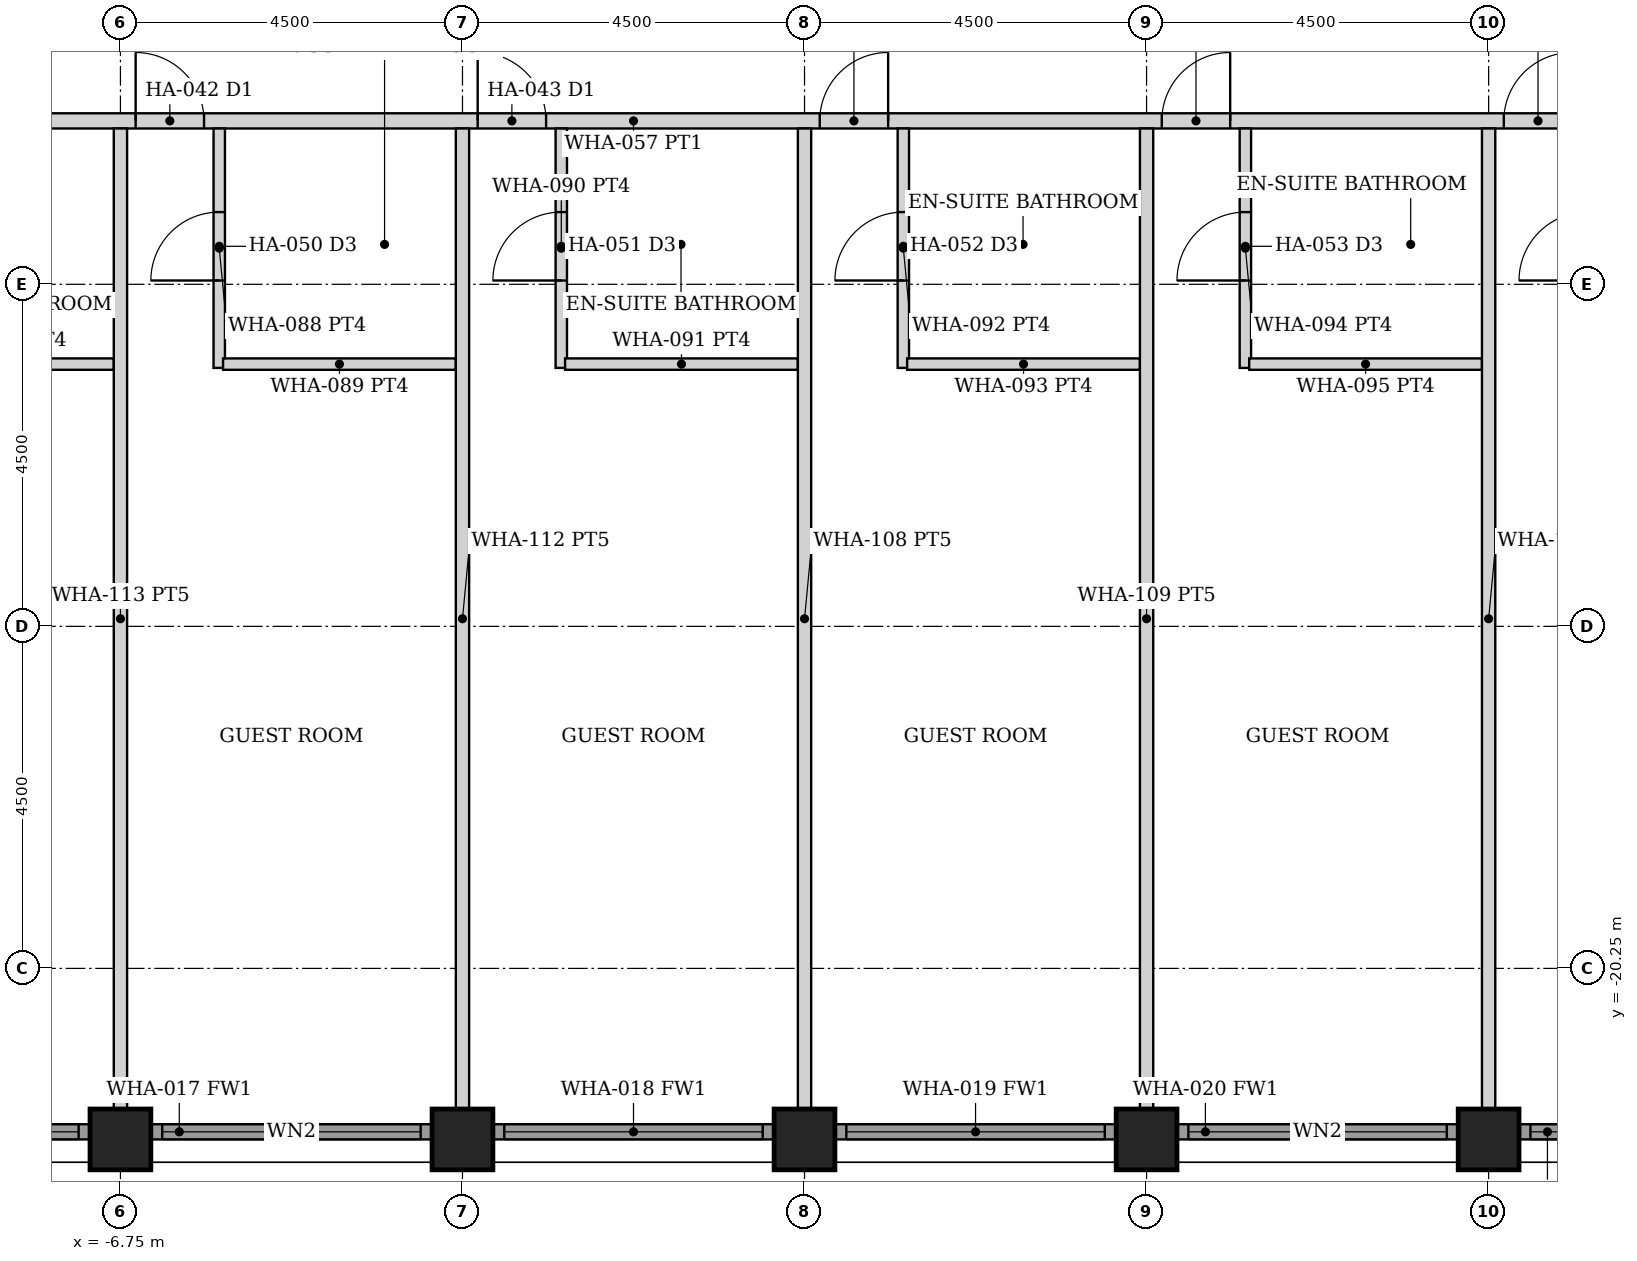
"""IFC4 building model, lengths in metres.
Left out: names, types, materials, properties, quantities, classifications, styles, units other than length and angle.
Written with IfcOpenShell. Run it as: python <this file> out.ifc"""

import sys

from ifc_helpers import new_model, si_unit, direction, frame, frame_2d, origin, origin_2d, place, context, subcontext, project, spatial, rectangle, hollow_rectangle, extrude, element, fill, save


model = new_model("IFC4")
c1 = context("Model", 3, precision=1e-05, world=origin(), true_north=direction((0.0, 1.0)))
c2 = subcontext(c1, "Body", "Model", "MODEL_VIEW")
j1 = project(units=[si_unit("LENGTHUNIT", "METRE"), si_unit("PLANEANGLEUNIT", "RADIAN")], contexts=[c1])
p1 = place(None, origin())
s1 = spatial("IfcSite", under=j1, at=p1, CompositionType="ELEMENT")
p2 = place(p1, origin())
s2 = spatial("IfcBuilding", under=s1, at=p2, CompositionType="ELEMENT")
p3 = place(p2, frame((0.0, 0.0, 118.4)))
s3 = spatial("IfcBuildingStorey", under=s2, at=p3, CompositionType="ELEMENT", Elevation=118.4)
for number, where, z_axis, x_axis in (
    (1, (-6.75, -22.5, 0.0), (0.0, 0.0, 1.0), (0.0, 1.0, 0.0)),
    (2, (-2.25, -22.5, 0.0), (0.0, 0.0, 1.0), (0.0, 1.0, 0.0)),
    (3, (2.25, -22.5, 0.0), (0.0, 0.0, 1.0), (0.0, 1.0, 0.0)),
    (4, (6.75, -22.5, 0.0), (0.0, 0.0, 1.0), (0.0, 1.0, 0.0)),
    (5, (11.25, -22.5, 0.0), (0.0, 0.0, 1.0), (0.0, 1.0, 0.0)),
):
    element("IfcColumn", number, at=place(p3, frame(where, z_axis=z_axis, x_axis=x_axis)), inside=s3, PredefinedType="COLUMN", context=c2, shape_type="SweptSolid", body=[
        extrude(hollow_rectangle(XDim=0.8, YDim=0.8, WallThickness=0.06, at=origin_2d()), origin(), (0.0, 0.0, 1.0), 3.6),
    ])
p4 = place(p3, frame((-10.845, -22.4, 0.0), z_axis=(0.0, 0.0, 1.0), x_axis=(1.0, 0.0, 0.0)))
e6 = element("IfcWall", 6, at=p4, inside=s3, PredefinedType="SOLIDWALL", context=c2, shape_type="SweptSolid", body=[
    extrude(rectangle(XDim=3.69, YDim=0.2, at=frame_2d((1.845, 0.0))), origin(), (0.0, 0.0, 1.0), 2.479),
])
p5 = place(p4, frame((0.145, 0.0, 0.3)))
e7 = element("IfcOpeningElement", 7, at=p5, cuts=e6, PredefinedType="OPENING", context=c2, shape_type="SweptSolid", body=[
    extrude(rectangle(XDim=3.4, YDim=2.029, at=frame_2d((1.7, 1.015))), frame((0.0, 0.11, 0.0), z_axis=(0.0, -1.0, 0.0), x_axis=(1.0, 0.0, 0.0)), (0.0, 0.0, 1.0), 0.22),
])
p6 = place(p3, frame((-6.345, -22.4, 0.0), z_axis=(0.0, 0.0, 1.0), x_axis=(1.0, 0.0, 0.0)))
e8 = element("IfcWall", 8, at=p6, inside=s3, PredefinedType="SOLIDWALL", context=c2, shape_type="SweptSolid", body=[
    extrude(rectangle(XDim=3.69, YDim=0.2, at=frame_2d((1.845, 0.0))), origin(), (0.0, 0.0, 1.0), 2.479),
])
p7 = place(p6, frame((0.145, 0.0, 0.3)))
e9 = element("IfcOpeningElement", 9, at=p7, cuts=e8, PredefinedType="OPENING", context=c2, shape_type="SweptSolid", body=[
    extrude(rectangle(XDim=3.4, YDim=2.029, at=frame_2d((1.7, 1.015))), frame((0.0, 0.11, 0.0), z_axis=(0.0, -1.0, 0.0), x_axis=(1.0, 0.0, 0.0)), (0.0, 0.0, 1.0), 0.22),
])
p8 = place(p3, frame((-1.845, -22.4, 0.0), z_axis=(0.0, 0.0, 1.0), x_axis=(1.0, 0.0, 0.0)))
e10 = element("IfcWall", 10, at=p8, inside=s3, PredefinedType="SOLIDWALL", context=c2, shape_type="SweptSolid", body=[
    extrude(rectangle(XDim=3.69, YDim=0.2, at=frame_2d((1.845, 0.0))), origin(), (0.0, 0.0, 1.0), 2.479),
])
p9 = place(p8, frame((0.145, 0.0, 0.3)))
e11 = element("IfcOpeningElement", 11, at=p9, cuts=e10, PredefinedType="OPENING", context=c2, shape_type="SweptSolid", body=[
    extrude(rectangle(XDim=3.4, YDim=2.029, at=frame_2d((1.7, 1.015))), frame((0.0, 0.11, 0.0), z_axis=(0.0, -1.0, 0.0), x_axis=(1.0, 0.0, 0.0)), (0.0, 0.0, 1.0), 0.22),
])
p10 = place(p3, frame((2.655, -22.4, 0.0), z_axis=(0.0, 0.0, 1.0), x_axis=(1.0, 0.0, 0.0)))
e12 = element("IfcWall", 12, at=p10, inside=s3, PredefinedType="SOLIDWALL", context=c2, shape_type="SweptSolid", body=[
    extrude(rectangle(XDim=3.69, YDim=0.2, at=frame_2d((1.845, 0.0))), origin(), (0.0, 0.0, 1.0), 2.479),
])
p11 = place(p10, frame((0.145, 0.0, 0.3)))
e13 = element("IfcOpeningElement", 13, at=p11, cuts=e12, PredefinedType="OPENING", context=c2, shape_type="SweptSolid", body=[
    extrude(rectangle(XDim=3.4, YDim=2.029, at=frame_2d((1.7, 1.015))), frame((0.0, 0.11, 0.0), z_axis=(0.0, -1.0, 0.0), x_axis=(1.0, 0.0, 0.0)), (0.0, 0.0, 1.0), 0.22),
])
p12 = place(p3, frame((7.155, -22.4, 0.0), z_axis=(0.0, 0.0, 1.0), x_axis=(1.0, 0.0, 0.0)))
e14 = element("IfcWall", 14, at=p12, inside=s3, PredefinedType="SOLIDWALL", context=c2, shape_type="SweptSolid", body=[
    extrude(rectangle(XDim=3.69, YDim=0.2, at=frame_2d((1.845, 0.0))), origin(), (0.0, 0.0, 1.0), 2.479),
])
p13 = place(p12, frame((0.145, 0.0, 0.3)))
e15 = element("IfcOpeningElement", 15, at=p13, cuts=e14, PredefinedType="OPENING", context=c2, shape_type="SweptSolid", body=[
    extrude(rectangle(XDim=3.4, YDim=2.029, at=frame_2d((1.7, 1.015))), frame((0.0, 0.11, 0.0), z_axis=(0.0, -1.0, 0.0), x_axis=(1.0, 0.0, 0.0)), (0.0, 0.0, 1.0), 0.22),
])
p14 = place(p3, frame((11.655, -22.4, 0.0), z_axis=(0.0, 0.0, 1.0), x_axis=(1.0, 0.0, 0.0)))
e16 = element("IfcWall", 16, at=p14, inside=s3, PredefinedType="SOLIDWALL", context=c2, shape_type="SweptSolid", body=[
    extrude(rectangle(XDim=3.69, YDim=0.2, at=frame_2d((1.845, 0.0))), origin(), (0.0, 0.0, 1.0), 2.479),
])
p15 = place(p14, frame((0.145, 0.0, 0.3)))
e17 = element("IfcOpeningElement", 17, at=p15, cuts=e16, PredefinedType="OPENING", context=c2, shape_type="SweptSolid", body=[
    extrude(rectangle(XDim=3.4, YDim=2.029, at=frame_2d((1.7, 1.015))), frame((0.0, 0.11, 0.0), z_axis=(0.0, -1.0, 0.0), x_axis=(1.0, 0.0, 0.0)), (0.0, 0.0, 1.0), 0.22),
])
p16 = place(p3, frame((-22.3, -9.1, 0.0), z_axis=(0.0, 0.0, 1.0), x_axis=(1.0, 0.0, 0.0)))
e18 = element("IfcWall", 18, at=p16, inside=s3, PredefinedType="PARTITIONING", context=c2, shape_type="SweptSolid", body=[
    extrude(rectangle(XDim=44.6, YDim=0.2, at=frame_2d((22.3, 0.0))), origin(), (0.0, 0.0, 1.0), 2.473),
])
p17 = place(p16, frame((6.75, 0.0, 0.0)))
e19 = element("IfcOpeningElement", 19, at=p17, cuts=e18, PredefinedType="OPENING", context=c2, shape_type="SweptSolid", body=[
    extrude(rectangle(XDim=0.9, YDim=2.1, at=frame_2d((0.45, 1.05))), frame((0.0, 0.11, 0.0), z_axis=(0.0, -1.0, 0.0), x_axis=(1.0, 0.0, 0.0)), (0.0, 0.0, 1.0), 0.22),
])
p18 = place(p16, frame((11.25, 0.0, 0.0)))
e20 = element("IfcOpeningElement", 20, at=p18, cuts=e18, PredefinedType="OPENING", context=c2, shape_type="SweptSolid", body=[
    extrude(rectangle(XDim=0.9, YDim=2.1, at=frame_2d((0.45, 1.05))), frame((0.0, 0.11, 0.0), z_axis=(0.0, -1.0, 0.0), x_axis=(1.0, 0.0, 0.0)), (0.0, 0.0, 1.0), 0.22),
])
p19 = place(p16, frame((15.75, 0.0, 0.0)))
e21 = element("IfcOpeningElement", 21, at=p19, cuts=e18, PredefinedType="OPENING", context=c2, shape_type="SweptSolid", body=[
    extrude(rectangle(XDim=0.9, YDim=2.1, at=frame_2d((0.45, 1.05))), frame((0.0, 0.11, 0.0), z_axis=(0.0, -1.0, 0.0), x_axis=(1.0, 0.0, 0.0)), (0.0, 0.0, 1.0), 0.22),
])
p20 = place(p16, frame((20.25, 0.0, 0.0)))
e22 = element("IfcOpeningElement", 22, at=p20, cuts=e18, PredefinedType="OPENING", context=c2, shape_type="SweptSolid", body=[
    extrude(rectangle(XDim=0.9, YDim=2.1, at=frame_2d((0.45, 1.05))), frame((0.0, 0.11, 0.0), z_axis=(0.0, -1.0, 0.0), x_axis=(1.0, 0.0, 0.0)), (0.0, 0.0, 1.0), 0.22),
])
p21 = place(p16, frame((24.75, 0.0, 0.0)))
e23 = element("IfcOpeningElement", 23, at=p21, cuts=e18, PredefinedType="OPENING", context=c2, shape_type="SweptSolid", body=[
    extrude(rectangle(XDim=0.9, YDim=2.1, at=frame_2d((0.45, 1.05))), frame((0.0, 0.11, 0.0), z_axis=(0.0, -1.0, 0.0), x_axis=(1.0, 0.0, 0.0)), (0.0, 0.0, 1.0), 0.22),
])
p22 = place(p16, frame((29.25, 0.0, 0.0)))
e24 = element("IfcOpeningElement", 24, at=p22, cuts=e18, PredefinedType="OPENING", context=c2, shape_type="SweptSolid", body=[
    extrude(rectangle(XDim=0.9, YDim=2.1, at=frame_2d((0.45, 1.05))), frame((0.0, 0.11, 0.0), z_axis=(0.0, -1.0, 0.0), x_axis=(1.0, 0.0, 0.0)), (0.0, 0.0, 1.0), 0.22),
])
p23 = place(p16, frame((33.75, 0.0, 0.0)))
e25 = element("IfcOpeningElement", 25, at=p23, cuts=e18, PredefinedType="OPENING", context=c2, shape_type="SweptSolid", body=[
    extrude(rectangle(XDim=0.9, YDim=2.1, at=frame_2d((0.45, 1.05))), frame((0.0, 0.11, 0.0), z_axis=(0.0, -1.0, 0.0), x_axis=(1.0, 0.0, 0.0)), (0.0, 0.0, 1.0), 0.22),
])
p24 = place(p16, frame((38.85, 0.0, 0.0)))
e26 = element("IfcOpeningElement", 26, at=p24, cuts=e18, PredefinedType="OPENING", context=c2, shape_type="SweptSolid", body=[
    extrude(rectangle(XDim=0.9, YDim=2.1, at=frame_2d((0.45, 1.05))), frame((0.0, 0.11, 0.0), z_axis=(0.0, -1.0, 0.0), x_axis=(1.0, 0.0, 0.0)), (0.0, 0.0, 1.0), 0.22),
])
p25 = place(p16, frame((4.85, 0.0, 0.0)))
e27 = element("IfcOpeningElement", 27, at=p25, cuts=e18, PredefinedType="OPENING", context=c2, shape_type="SweptSolid", body=[
    extrude(rectangle(XDim=0.9, YDim=2.1, at=frame_2d((0.45, 1.05))), frame((0.0, 0.11, 0.0), z_axis=(0.0, -1.0, 0.0), x_axis=(1.0, 0.0, 0.0)), (0.0, 0.0, 1.0), 0.22),
])
p26 = place(p3, frame((-9.9, -12.3, 0.0), z_axis=(0.0, 0.0, 1.0), x_axis=(1.0, 0.0, 0.0)))
e28 = element("IfcWall", 28, at=p26, inside=s3, PredefinedType="PARTITIONING", context=c2, shape_type="SweptSolid", body=[
    extrude(rectangle(XDim=3.062, YDim=0.15, at=frame_2d((1.531, 0.0))), origin(), (0.0, 0.0, 1.0), 2.473),
])
p27 = place(p3, frame((-5.45, -12.35, 0.0), z_axis=(0.0, 0.0, 1.0), x_axis=(0.0, 1.0, 0.0)))
e29 = element("IfcWall", 29, at=p27, inside=s3, PredefinedType="PARTITIONING", context=c2, shape_type="SweptSolid", body=[
    extrude(rectangle(XDim=3.15, YDim=0.15, at=frame_2d((1.575, 0.0))), origin(), (0.0, 0.0, 1.0), 2.473),
])
p28 = place(p27, frame((1.15, 0.0, 0.0)))
e30 = element("IfcOpeningElement", 30, at=p28, cuts=e29, PredefinedType="OPENING", context=c2, shape_type="SweptSolid", body=[
    extrude(rectangle(XDim=0.9, YDim=2.1, at=frame_2d((0.45, 1.05))), frame((0.0, 0.085, 0.0), z_axis=(0.0, -1.0, 0.0), x_axis=(1.0, 0.0, 0.0)), (0.0, 0.0, 1.0), 0.17),
])
p29 = place(p3, frame((-5.4, -12.3, 0.0), z_axis=(0.0, 0.0, 1.0), x_axis=(1.0, 0.0, 0.0)))
e31 = element("IfcWall", 31, at=p29, inside=s3, PredefinedType="PARTITIONING", context=c2, shape_type="SweptSolid", body=[
    extrude(rectangle(XDim=3.062, YDim=0.15, at=frame_2d((1.531, 0.0))), origin(), (0.0, 0.0, 1.0), 2.473),
])
p30 = place(p3, frame((-0.95, -12.35, 0.0), z_axis=(0.0, 0.0, 1.0), x_axis=(0.0, 1.0, 0.0)))
e32 = element("IfcWall", 32, at=p30, inside=s3, PredefinedType="PARTITIONING", context=c2, shape_type="SweptSolid", body=[
    extrude(rectangle(XDim=3.15, YDim=0.15, at=frame_2d((1.575, 0.0))), origin(), (0.0, 0.0, 1.0), 2.473),
])
p31 = place(p30, frame((1.15, 0.0, 0.0)))
e33 = element("IfcOpeningElement", 33, at=p31, cuts=e32, PredefinedType="OPENING", context=c2, shape_type="SweptSolid", body=[
    extrude(rectangle(XDim=0.9, YDim=2.1, at=frame_2d((0.45, 1.05))), frame((0.0, 0.085, 0.0), z_axis=(0.0, -1.0, 0.0), x_axis=(1.0, 0.0, 0.0)), (0.0, 0.0, 1.0), 0.17),
])
p32 = place(p3, frame((-0.9, -12.3, 0.0), z_axis=(0.0, 0.0, 1.0), x_axis=(1.0, 0.0, 0.0)))
e34 = element("IfcWall", 34, at=p32, inside=s3, PredefinedType="PARTITIONING", context=c2, shape_type="SweptSolid", body=[
    extrude(rectangle(XDim=3.062, YDim=0.15, at=frame_2d((1.531, 0.0))), origin(), (0.0, 0.0, 1.0), 2.473),
])
p33 = place(p3, frame((3.55, -12.35, 0.0), z_axis=(0.0, 0.0, 1.0), x_axis=(0.0, 1.0, 0.0)))
e35 = element("IfcWall", 35, at=p33, inside=s3, PredefinedType="PARTITIONING", context=c2, shape_type="SweptSolid", body=[
    extrude(rectangle(XDim=3.15, YDim=0.15, at=frame_2d((1.575, 0.0))), origin(), (0.0, 0.0, 1.0), 2.473),
])
p34 = place(p33, frame((1.15, 0.0, 0.0)))
e36 = element("IfcOpeningElement", 36, at=p34, cuts=e35, PredefinedType="OPENING", context=c2, shape_type="SweptSolid", body=[
    extrude(rectangle(XDim=0.9, YDim=2.1, at=frame_2d((0.45, 1.05))), frame((0.0, 0.085, 0.0), z_axis=(0.0, -1.0, 0.0), x_axis=(1.0, 0.0, 0.0)), (0.0, 0.0, 1.0), 0.17),
])
p35 = place(p3, frame((3.6, -12.3, 0.0), z_axis=(0.0, 0.0, 1.0), x_axis=(1.0, 0.0, 0.0)))
e37 = element("IfcWall", 37, at=p35, inside=s3, PredefinedType="PARTITIONING", context=c2, shape_type="SweptSolid", body=[
    extrude(rectangle(XDim=3.062, YDim=0.15, at=frame_2d((1.531, 0.0))), origin(), (0.0, 0.0, 1.0), 2.473),
])
p36 = place(p3, frame((8.05, -12.35, 0.0), z_axis=(0.0, 0.0, 1.0), x_axis=(0.0, 1.0, 0.0)))
e38 = element("IfcWall", 38, at=p36, inside=s3, PredefinedType="PARTITIONING", context=c2, shape_type="SweptSolid", body=[
    extrude(rectangle(XDim=3.15, YDim=0.15, at=frame_2d((1.575, 0.0))), origin(), (0.0, 0.0, 1.0), 2.473),
])
p37 = place(p36, frame((1.15, 0.0, 0.0)))
e39 = element("IfcOpeningElement", 39, at=p37, cuts=e38, PredefinedType="OPENING", context=c2, shape_type="SweptSolid", body=[
    extrude(rectangle(XDim=0.9, YDim=2.1, at=frame_2d((0.45, 1.05))), frame((0.0, 0.085, 0.0), z_axis=(0.0, -1.0, 0.0), x_axis=(1.0, 0.0, 0.0)), (0.0, 0.0, 1.0), 0.17),
])
p38 = place(p3, frame((8.1, -12.3, 0.0), z_axis=(0.0, 0.0, 1.0), x_axis=(1.0, 0.0, 0.0)))
e40 = element("IfcWall", 40, at=p38, inside=s3, PredefinedType="PARTITIONING", context=c2, shape_type="SweptSolid", body=[
    extrude(rectangle(XDim=3.062, YDim=0.15, at=frame_2d((1.531, 0.0))), origin(), (0.0, 0.0, 1.0), 2.473),
])
for number, where, z_axis, x_axis in (
    (41, (-6.75, -22.1, 0.0), (0.0, 0.0, 1.0), (0.0, 1.0, 0.0)),
    (42, (-2.25, -22.1, 0.0), (0.0, 0.0, 1.0), (0.0, 1.0, 0.0)),
    (43, (2.25, -22.1, 0.0), (0.0, 0.0, 1.0), (0.0, 1.0, 0.0)),
    (44, (6.75, -22.1, 0.0), (0.0, 0.0, 1.0), (0.0, 1.0, 0.0)),
    (45, (11.25, -22.1, 0.0), (0.0, 0.0, 1.0), (0.0, 1.0, 0.0)),
):
    element("IfcWall", number, at=place(p3, frame(where, z_axis=z_axis, x_axis=x_axis)), inside=s3, PredefinedType="PARTITIONING", context=c2, shape_type="SweptSolid", body=[
        extrude(rectangle(XDim=12.9, YDim=0.175, at=frame_2d((6.45, 0.0))), origin(), (0.0, 0.0, 1.0), 2.473),
    ])
p39 = place(p5, origin())
e46 = element("IfcWindow", 46, at=p39, inside=s3, PartitioningType="SINGLE_PANEL", PredefinedType="WINDOW", context=c2, shape_type="SweptSolid", body=[
    extrude(rectangle(XDim=3.4, YDim=2.029, at=frame_2d((1.7, 1.015))), frame((0.0, 0.03, 0.0), z_axis=(0.0, -1.0, 0.0), x_axis=(1.0, 0.0, 0.0)), (0.0, 0.0, 1.0), 0.06),
])
fill(e7, e46)
p40 = place(p7, origin())
e47 = element("IfcWindow", 47, at=p40, inside=s3, PartitioningType="SINGLE_PANEL", PredefinedType="WINDOW", context=c2, shape_type="SweptSolid", body=[
    extrude(rectangle(XDim=3.4, YDim=2.029, at=frame_2d((1.7, 1.015))), frame((0.0, 0.03, 0.0), z_axis=(0.0, -1.0, 0.0), x_axis=(1.0, 0.0, 0.0)), (0.0, 0.0, 1.0), 0.06),
])
fill(e9, e47)
p41 = place(p9, origin())
e48 = element("IfcWindow", 48, at=p41, inside=s3, PartitioningType="SINGLE_PANEL", PredefinedType="WINDOW", context=c2, shape_type="SweptSolid", body=[
    extrude(rectangle(XDim=3.4, YDim=2.029, at=frame_2d((1.7, 1.015))), frame((0.0, 0.03, 0.0), z_axis=(0.0, -1.0, 0.0), x_axis=(1.0, 0.0, 0.0)), (0.0, 0.0, 1.0), 0.06),
])
fill(e11, e48)
p42 = place(p11, origin())
e49 = element("IfcWindow", 49, at=p42, inside=s3, PartitioningType="SINGLE_PANEL", PredefinedType="WINDOW", context=c2, shape_type="SweptSolid", body=[
    extrude(rectangle(XDim=3.4, YDim=2.029, at=frame_2d((1.7, 1.015))), frame((0.0, 0.03, 0.0), z_axis=(0.0, -1.0, 0.0), x_axis=(1.0, 0.0, 0.0)), (0.0, 0.0, 1.0), 0.06),
])
fill(e13, e49)
p43 = place(p13, origin())
e50 = element("IfcWindow", 50, at=p43, inside=s3, PartitioningType="SINGLE_PANEL", PredefinedType="WINDOW", context=c2, shape_type="SweptSolid", body=[
    extrude(rectangle(XDim=3.4, YDim=2.029, at=frame_2d((1.7, 1.015))), frame((0.0, 0.03, 0.0), z_axis=(0.0, -1.0, 0.0), x_axis=(1.0, 0.0, 0.0)), (0.0, 0.0, 1.0), 0.06),
])
fill(e15, e50)
p44 = place(p15, origin())
e51 = element("IfcWindow", 51, at=p44, inside=s3, PartitioningType="SINGLE_PANEL", PredefinedType="WINDOW", context=c2, shape_type="SweptSolid", body=[
    extrude(rectangle(XDim=3.4, YDim=2.029, at=frame_2d((1.7, 1.015))), frame((0.0, 0.03, 0.0), z_axis=(0.0, -1.0, 0.0), x_axis=(1.0, 0.0, 0.0)), (0.0, 0.0, 1.0), 0.06),
])
fill(e17, e51)
p45 = place(p19, origin())
e52 = element("IfcDoor", 52, at=p45, inside=s3, OperationType="SINGLE_SWING_LEFT", PredefinedType="DOOR", context=c2, shape_type="SweptSolid", body=[
    extrude(rectangle(XDim=0.9, YDim=2.1, at=frame_2d((0.45, 1.05))), frame((0.0, 0.025, 0.0), z_axis=(0.0, -1.0, 0.0), x_axis=(1.0, 0.0, 0.0)), (0.0, 0.0, 1.0), 0.05),
])
fill(e21, e52)
p46 = place(p28, origin())
e53 = element("IfcDoor", 53, at=p46, inside=s3, OperationType="SINGLE_SWING_LEFT", PredefinedType="DOOR", context=c2, shape_type="SweptSolid", body=[
    extrude(rectangle(XDim=0.9, YDim=2.1, at=frame_2d((0.45, 1.05))), frame((0.0, 0.025, 0.0), z_axis=(0.0, -1.0, 0.0), x_axis=(1.0, 0.0, 0.0)), (0.0, 0.0, 1.0), 0.05),
])
fill(e30, e53)
p47 = place(p20, origin())
e54 = element("IfcDoor", 54, at=p47, inside=s3, OperationType="SINGLE_SWING_LEFT", PredefinedType="DOOR", context=c2, shape_type="SweptSolid", body=[
    extrude(rectangle(XDim=0.9, YDim=2.1, at=frame_2d((0.45, 1.05))), frame((0.0, 0.025, 0.0), z_axis=(0.0, -1.0, 0.0), x_axis=(1.0, 0.0, 0.0)), (0.0, 0.0, 1.0), 0.05),
])
fill(e22, e54)
p48 = place(p31, origin())
e55 = element("IfcDoor", 55, at=p48, inside=s3, OperationType="SINGLE_SWING_LEFT", PredefinedType="DOOR", context=c2, shape_type="SweptSolid", body=[
    extrude(rectangle(XDim=0.9, YDim=2.1, at=frame_2d((0.45, 1.05))), frame((0.0, 0.025, 0.0), z_axis=(0.0, -1.0, 0.0), x_axis=(1.0, 0.0, 0.0)), (0.0, 0.0, 1.0), 0.05),
])
fill(e33, e55)
p49 = place(p21, origin())
e56 = element("IfcDoor", 56, at=p49, inside=s3, OperationType="SINGLE_SWING_RIGHT", PredefinedType="DOOR", context=c2, shape_type="SweptSolid", body=[
    extrude(rectangle(XDim=0.9, YDim=2.1, at=frame_2d((0.45, 1.05))), frame((0.0, 0.025, 0.0), z_axis=(0.0, -1.0, 0.0), x_axis=(1.0, 0.0, 0.0)), (0.0, 0.0, 1.0), 0.05),
])
fill(e23, e56)
p50 = place(p34, origin())
e57 = element("IfcDoor", 57, at=p50, inside=s3, OperationType="SINGLE_SWING_LEFT", PredefinedType="DOOR", context=c2, shape_type="SweptSolid", body=[
    extrude(rectangle(XDim=0.9, YDim=2.1, at=frame_2d((0.45, 1.05))), frame((0.0, 0.025, 0.0), z_axis=(0.0, -1.0, 0.0), x_axis=(1.0, 0.0, 0.0)), (0.0, 0.0, 1.0), 0.05),
])
fill(e36, e57)
p51 = place(p22, origin())
e58 = element("IfcDoor", 58, at=p51, inside=s3, OperationType="SINGLE_SWING_RIGHT", PredefinedType="DOOR", context=c2, shape_type="SweptSolid", body=[
    extrude(rectangle(XDim=0.9, YDim=2.1, at=frame_2d((0.45, 1.05))), frame((0.0, 0.025, 0.0), z_axis=(0.0, -1.0, 0.0), x_axis=(1.0, 0.0, 0.0)), (0.0, 0.0, 1.0), 0.05),
])
fill(e24, e58)
p52 = place(p37, origin())
e59 = element("IfcDoor", 59, at=p52, inside=s3, OperationType="SINGLE_SWING_LEFT", PredefinedType="DOOR", context=c2, shape_type="SweptSolid", body=[
    extrude(rectangle(XDim=0.9, YDim=2.1, at=frame_2d((0.45, 1.05))), frame((0.0, 0.025, 0.0), z_axis=(0.0, -1.0, 0.0), x_axis=(1.0, 0.0, 0.0)), (0.0, 0.0, 1.0), 0.05),
])
fill(e39, e59)
p53 = place(p23, origin())
e60 = element("IfcDoor", 60, at=p53, inside=s3, OperationType="SINGLE_SWING_RIGHT", PredefinedType="DOOR", context=c2, shape_type="SweptSolid", body=[
    extrude(rectangle(XDim=0.9, YDim=2.1, at=frame_2d((0.45, 1.05))), frame((0.0, 0.025, 0.0), z_axis=(0.0, -1.0, 0.0), x_axis=(1.0, 0.0, 0.0)), (0.0, 0.0, 1.0), 0.05),
])
fill(e25, e60)
save(model, sys.argv[1])
